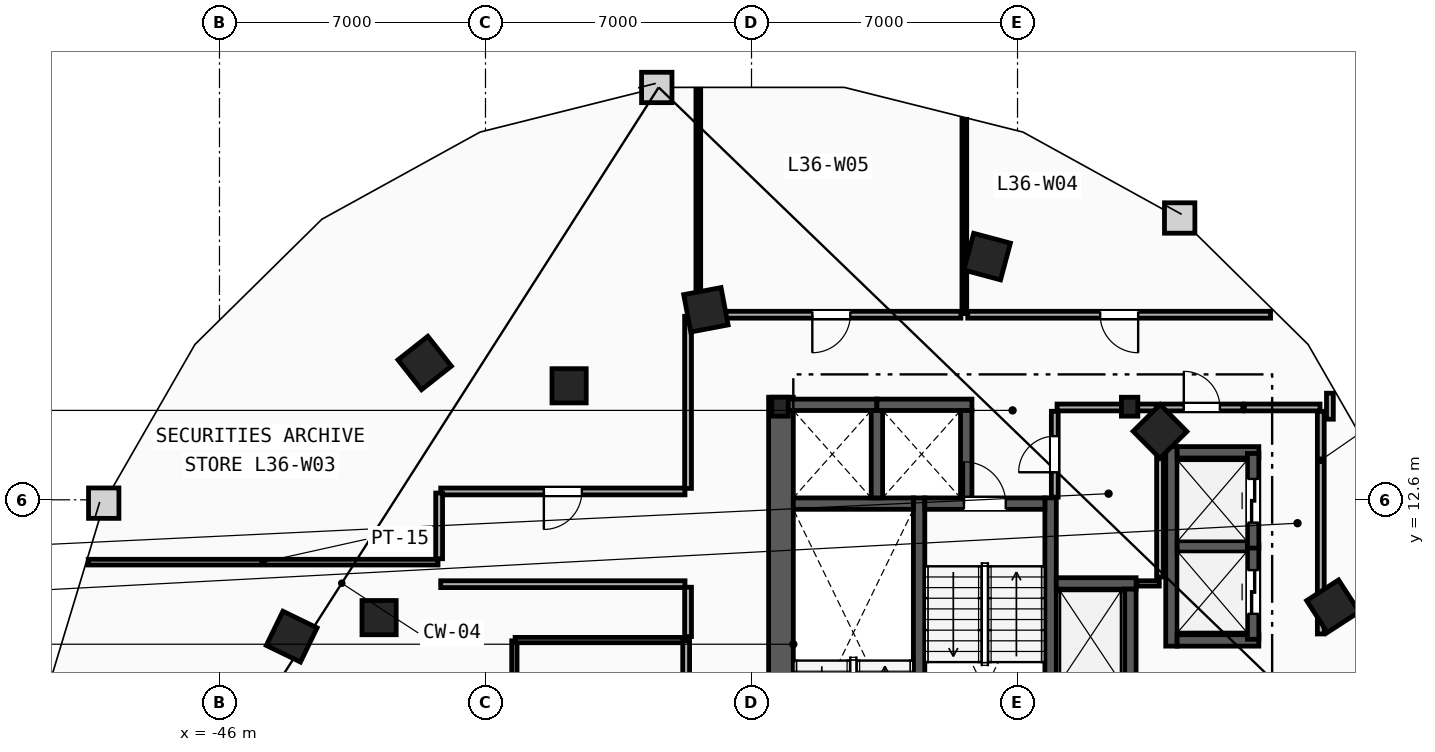
"""IFC4 building model, lengths in metres.
Left out: names, types, materials, properties, quantities, classifications, styles, units other than length and angle.
Written with IfcOpenShell. Run it as: python <this file> out.ifc"""

import sys

from ifc_helpers import new_model, si_unit, direction, frame, frame_2d, origin, origin_2d, place, context, subcontext, project, spatial, rectangle, i_section, extrude, element, fill, save


model = new_model("IFC4")
c1 = context("Model", 3, precision=1e-05, world=origin(), true_north=direction((0.0, 1.0)))
c2 = subcontext(c1, "Body", "Model", "MODEL_VIEW")
j1 = project(units=[si_unit("LENGTHUNIT", "METRE"), si_unit("PLANEANGLEUNIT", "RADIAN")], contexts=[c1])
p1 = place(None, origin())
s1 = spatial("IfcSite", under=j1, at=p1, CompositionType="ELEMENT")
p2 = place(p1, origin())
s2 = spatial("IfcBuilding", under=s1, at=p2, CompositionType="ELEMENT")
p3 = place(p2, frame((0.0, 0.0, 140.4)))
s3 = spatial("IfcBuildingStorey", under=s2, at=p3, CompositionType="ELEMENT", Elevation=140.4)
for number, where, z_axis, x_axis in (
    (1, (-22.05, 15.05, 0.0), (0.0, 0.0, 1.0), (1.0, 0.0, 0.0)),
    (2, (-31.25, 15.05, 0.0), (0.0, 0.0, 1.0), (1.0, 0.0, 0.0)),
):
    element("IfcColumn", number, at=place(p3, frame(where, z_axis=z_axis, x_axis=x_axis)), inside=s3, PredefinedType="COLUMN", context=c2, shape_type="SweptSolid", body=[
        extrude(i_section(OverallWidth=0.432, OverallDepth=0.498, WebThickness=0.056, FlangeThickness=0.089, FilletRadius=0.018, at=origin_2d()), origin(), (0.0, 0.0, 1.0), 3.6),
    ])
for number, where, z_axis, x_axis in (
    (3, (-41.8, 9.5, 0.0), (0.0, 0.0, 1.0), (1.0, 0.0, 0.0)),
    (4, (-36.8, 15.6, 0.0), (0.0, 0.0, 1.0), (1.0, 0.0, 0.0)),
):
    element("IfcColumn", number, at=place(p3, frame(where, z_axis=z_axis, x_axis=x_axis)), inside=s3, PredefinedType="COLUMN", context=c2, shape_type="SweptSolid", body=[
        extrude(rectangle(XDim=0.9, YDim=0.9, at=origin_2d()), origin(), (0.0, 0.0, 1.0), 3.6),
    ])
for number, where, z_axis, x_axis in (
    (5, (-16.7, 9.8, 0.0), (0.0, 0.0, 1.0), (-0.544, 0.839, 0.0)),
    (6, (-21.25, 14.4, 0.0), (0.0, 0.0, 1.0), (-0.703, 0.711, 0.0)),
    (7, (-25.8, 19.0, 0.0), (0.0, 0.0, 1.0), (-0.966, 0.259, 0.0)),
    (8, (-33.2, 17.6, 0.0), (0.0, 0.0, 1.0), (-0.983, -0.186, 0.0)),
    (9, (-40.6, 16.2, 0.0), (0.0, 0.0, 1.0), (-0.785, -0.619, 0.0)),
    (10, (-44.1, 9.0, 0.0), (0.0, 0.0, 1.0), (-0.437, -0.899, 0.0)),
):
    element("IfcColumn", number, at=place(p3, frame(where, z_axis=z_axis, x_axis=x_axis)), inside=s3, PredefinedType="COLUMN", context=c2, shape_type="SweptSolid", body=[
        extrude(rectangle(XDim=1.0, YDim=1.0, at=origin_2d()), origin(), (0.0, 0.0, 1.0), 3.6),
    ])
p4 = place(p3, frame((-31.225, 1.97, 0.0), z_axis=(0.0, 0.0, 1.0), x_axis=(0.0, 1.0, 0.0)))
e11 = element("IfcWall", 11, at=p4, inside=s3, PredefinedType="SHEAR", context=c2, shape_type="SweptSolid", body=[
    extrude(rectangle(XDim=13.33, YDim=0.65, at=frame_2d((6.665, 0.0))), origin(), (0.0, 0.0, 1.0), 3.36),
])
for number, where, z_axis, x_axis in (
    (12, (-27.59, 1.97, 0.0), (0.0, 0.0, 1.0), (0.0, 1.0, 0.0)),
    (13, (-24.13, 1.97, 0.0), (0.0, 0.0, 1.0), (0.0, 1.0, 0.0)),
):
    element("IfcWall", number, at=place(p3, frame(where, z_axis=z_axis, x_axis=x_axis)), inside=s3, PredefinedType="SHEAR", context=c2, shape_type="SweptSolid", body=[
        extrude(rectangle(XDim=10.68, YDim=0.3, at=frame_2d((5.34, 0.0))), origin(), (0.0, 0.0, 1.0), 3.36),
    ])
p5 = place(p3, frame((-30.9, 12.5, 0.0), z_axis=(0.0, 0.0, 1.0), x_axis=(1.0, 0.0, 0.0)))
e14 = element("IfcWall", 14, at=p5, inside=s3, PredefinedType="SHEAR", context=c2, shape_type="SweptSolid", body=[
    extrude(rectangle(XDim=3.16, YDim=0.3, at=frame_2d((1.58, 0.0))), origin(), (0.0, 0.0, 1.0), 3.36),
])
p6 = place(p3, frame((-27.44, 12.5, 0.0), z_axis=(0.0, 0.0, 1.0), x_axis=(1.0, 0.0, 0.0)))
e15 = element("IfcWall", 15, at=p6, inside=s3, PredefinedType="SHEAR", context=c2, shape_type="SweptSolid", body=[
    extrude(rectangle(XDim=3.16, YDim=0.3, at=frame_2d((1.58, 0.0))), origin(), (0.0, 0.0, 1.0), 3.36),
])
p7 = place(p6, frame((1.03, 0.0, 0.0)))
e16 = element("IfcOpeningElement", 16, at=p7, cuts=e15, PredefinedType="OPENING", context=c2, shape_type="SweptSolid", body=[
    extrude(rectangle(XDim=1.1, YDim=2.15, at=frame_2d((0.55, 1.075))), frame((0.0, 0.16, 0.0), z_axis=(0.0, -1.0, 0.0), x_axis=(1.0, 0.0, 0.0)), (0.0, 0.0, 1.0), 0.32),
])
p8 = place(p3, frame((-23.98, 10.4, 0.0), z_axis=(0.0, 0.0, 1.0), x_axis=(1.0, 0.0, 0.0)))
e17 = element("IfcWall", 17, at=p8, inside=s3, PredefinedType="SHEAR", context=c2, shape_type="SweptSolid", body=[
    extrude(rectangle(XDim=2.1, YDim=0.3, at=frame_2d((1.05, 0.0))), origin(), (0.0, 0.0, 1.0), 3.36),
])
for number, where, z_axis, x_axis in (
    (18, (-22.03, 7.75, 0.0), (0.0, 0.0, 1.0), (0.0, 1.0, 0.0)),
    (19, (-31.2, 15.1, 0.0), (0.0, 0.0, 1.0), (1.0, 0.0, 0.0)),
):
    element("IfcWall", number, at=place(p3, frame(where, z_axis=z_axis, x_axis=x_axis)), inside=s3, PredefinedType="SHEAR", context=c2, shape_type="SweptSolid", body=[
        extrude(rectangle(XDim=2.5, YDim=0.3, at=frame_2d((1.25, 0.0))), origin(), (0.0, 0.0, 1.0), 3.36),
    ])
p9 = place(p3, frame((-28.7, 12.65, 0.0), z_axis=(0.0, 0.0, 1.0), x_axis=(0.0, 1.0, 0.0)))
e20 = element("IfcWall", 20, at=p9, inside=s3, PredefinedType="SHEAR", context=c2, shape_type="SweptSolid", body=[
    extrude(rectangle(XDim=2.3, YDim=0.3, at=frame_2d((1.15, 0.0))), origin(), (0.0, 0.0, 1.0), 3.36),
])
p10 = place(p3, frame((-28.7, 15.1, 0.0), z_axis=(0.0, 0.0, 1.0), x_axis=(1.0, 0.0, 0.0)))
e21 = element("IfcWall", 21, at=p10, inside=s3, PredefinedType="SHEAR", context=c2, shape_type="SweptSolid", body=[
    extrude(rectangle(XDim=2.5, YDim=0.3, at=frame_2d((1.25, 0.0))), origin(), (0.0, 0.0, 1.0), 3.36),
])
p11 = place(p3, frame((-26.35, 12.65, 0.0), z_axis=(0.0, 0.0, 1.0), x_axis=(0.0, 1.0, 0.0)))
e22 = element("IfcWall", 22, at=p11, inside=s3, PredefinedType="SHEAR", context=c2, shape_type="SweptSolid", body=[
    extrude(rectangle(XDim=2.3, YDim=0.3, at=frame_2d((1.15, 0.0))), origin(), (0.0, 0.0, 1.0), 3.36),
])
p12 = place(p3, frame((-20.95, 8.75, 0.0), z_axis=(0.0, 0.0, 1.0), x_axis=(0.0, 1.0, 0.0)))
e23 = element("IfcWall", 23, at=p12, inside=s3, PredefinedType="SHEAR", context=c2, shape_type="SweptSolid", body=[
    extrude(rectangle(XDim=5.25, YDim=0.3, at=frame_2d((2.625, 0.0))), origin(), (0.0, 0.0, 1.0), 3.36),
])
for number, where, z_axis, x_axis in (
    (24, (-20.8, 8.9, 0.0), (0.0, 0.0, 1.0), (1.0, 0.0, 0.0)),
    (25, (-20.8, 13.85, 0.0), (0.0, 0.0, 1.0), (1.0, 0.0, 0.0)),
):
    element("IfcWall", number, at=place(p3, frame(where, z_axis=z_axis, x_axis=x_axis)), inside=s3, PredefinedType="SHEAR", context=c2, shape_type="SweptSolid", body=[
        extrude(rectangle(XDim=2.15, YDim=0.3, at=frame_2d((1.075, 0.0))), origin(), (0.0, 0.0, 1.0), 3.36),
    ])
p13 = place(p3, frame((-20.8, 11.375, 0.0), z_axis=(0.0, 0.0, 1.0), x_axis=(1.0, 0.0, 0.0)))
e26 = element("IfcWall", 26, at=p13, inside=s3, PredefinedType="SHEAR", context=c2, shape_type="SweptSolid", body=[
    extrude(rectangle(XDim=1.85, YDim=0.3, at=frame_2d((0.925, 0.0))), origin(), (0.0, 0.0, 1.0), 3.36),
])
p14 = place(p3, frame((-18.8, 8.93, 0.0), z_axis=(0.0, 0.0, 1.0), x_axis=(0.0, 1.0, 0.0)))
e27 = element("IfcWall", 27, at=p14, inside=s3, PredefinedType="SHEAR", context=c2, shape_type="SweptSolid", body=[
    extrude(rectangle(XDim=2.49, YDim=0.3, at=frame_2d((1.245, 0.0))), origin(), (0.0, 0.0, 1.0), 3.36),
])
p15 = place(p14, frame((0.67, 0.0, 0.0)))
e28 = element("IfcOpeningElement", 28, at=p15, cuts=e27, PredefinedType="OPENING", context=c2, shape_type="SweptSolid", body=[
    extrude(rectangle(XDim=1.15, YDim=2.2, at=frame_2d((0.575, 1.1))), frame((0.0, 0.16, 0.0), z_axis=(0.0, -1.0, 0.0), x_axis=(1.0, 0.0, 0.0)), (0.0, 0.0, 1.0), 0.32),
])
p16 = place(p3, frame((-18.8, 11.33, 0.0), z_axis=(0.0, 0.0, 1.0), x_axis=(0.0, 1.0, 0.0)))
e29 = element("IfcWall", 29, at=p16, inside=s3, PredefinedType="SHEAR", context=c2, shape_type="SweptSolid", body=[
    extrude(rectangle(XDim=2.49, YDim=0.3, at=frame_2d((1.245, 0.0))), origin(), (0.0, 0.0, 1.0), 3.36),
])
p17 = place(p16, frame((0.67, 0.0, 0.0)))
e30 = element("IfcOpeningElement", 30, at=p17, cuts=e29, PredefinedType="OPENING", context=c2, shape_type="SweptSolid", body=[
    extrude(rectangle(XDim=1.15, YDim=2.2, at=frame_2d((0.575, 1.1))), frame((0.0, 0.16, 0.0), z_axis=(0.0, -1.0, 0.0), x_axis=(1.0, 0.0, 0.0)), (0.0, 0.0, 1.0), 0.32),
])
p18 = place(p3, frame((-17.02, 9.07, 0.0), z_axis=(0.0, 0.0, 1.0), x_axis=(0.0, 1.0, 0.0)))
e31 = element("IfcWall", 31, at=p18, inside=s3, PredefinedType="PARTITIONING", context=c2, shape_type="SweptSolid", body=[
    extrude(rectangle(XDim=5.86, YDim=0.18, at=frame_2d((2.93, 0.0))), origin(), (0.0, 0.0, 1.0), 3.36),
])
p19 = place(p3, frame((-21.23, 15.03, 0.0), z_axis=(0.0, 0.0, 1.0), x_axis=(1.0, 0.0, 0.0)))
e32 = element("IfcWall", 32, at=p19, inside=s3, PredefinedType="PARTITIONING", context=c2, shape_type="SweptSolid", body=[
    extrude(rectangle(XDim=2.16, YDim=0.18, at=frame_2d((1.08, 0.0))), origin(), (0.0, 0.0, 1.0), 3.36),
])
p20 = place(p19, frame((0.605, 0.0, 0.0)))
e33 = element("IfcOpeningElement", 33, at=p20, cuts=e32, PredefinedType="OPENING", context=c2, shape_type="SweptSolid", body=[
    extrude(rectangle(XDim=0.95, YDim=2.1, at=frame_2d((0.475, 1.05))), frame((0.0, 0.1, 0.0), z_axis=(0.0, -1.0, 0.0), x_axis=(1.0, 0.0, 0.0)), (0.0, 0.0, 1.0), 0.2),
])
p21 = place(p3, frame((-19.03, 15.03, 0.0), z_axis=(0.0, 0.0, 1.0), x_axis=(1.0, 0.0, 0.0)))
e34 = element("IfcWall", 34, at=p21, inside=s3, PredefinedType="PARTITIONING", context=c2, shape_type="SweptSolid", body=[
    extrude(rectangle(XDim=1.99, YDim=0.18, at=frame_2d((0.995, 0.0))), origin(), (0.0, 0.0, 1.0), 3.36),
])
p22 = place(p3, frame((-21.86, 10.4, 0.0), z_axis=(0.0, 0.0, 1.0), x_axis=(1.0, 0.0, 0.0)))
e35 = element("IfcWall", 35, at=p22, inside=s3, PredefinedType="PARTITIONING", context=c2, shape_type="SweptSolid", body=[
    extrude(rectangle(XDim=0.59, YDim=0.14, at=frame_2d((0.295, 0.0))), origin(), (0.0, 0.0, 1.0), 3.36),
])
p23 = place(p3, frame((-21.25, 10.57, 0.0), z_axis=(0.0, 0.0, 1.0), x_axis=(0.0, 1.0, 0.0)))
e36 = element("IfcWall", 36, at=p23, inside=s3, PredefinedType="PARTITIONING", context=c2, shape_type="SweptSolid", body=[
    extrude(rectangle(XDim=4.36, YDim=0.18, at=frame_2d((2.18, 0.0))), origin(), (0.0, 0.0, 1.0), 3.36),
])
p24 = place(p3, frame((-23.96, 15.03, 0.0), z_axis=(0.0, 0.0, 1.0), x_axis=(1.0, 0.0, 0.0)))
e37 = element("IfcWall", 37, at=p24, inside=s3, PredefinedType="PARTITIONING", context=c2, shape_type="SweptSolid", body=[
    extrude(rectangle(XDim=2.61, YDim=0.18, at=frame_2d((1.305, 0.0))), origin(), (0.0, 0.0, 1.0), 2.433),
])
p25 = place(p3, frame((-24.02, 12.67, 0.0), z_axis=(0.0, 0.0, 1.0), x_axis=(0.0, 1.0, 0.0)))
e38 = element("IfcWall", 38, at=p25, inside=s3, PredefinedType="PARTITIONING", context=c2, shape_type="SweptSolid", body=[
    extrude(rectangle(XDim=2.26, YDim=0.18, at=frame_2d((1.13, 0.0))), origin(), (0.0, 0.0, 1.0), 3.36),
])
p26 = place(p25, frame((0.655, 0.0, 0.0)))
e39 = element("IfcOpeningElement", 39, at=p26, cuts=e38, PredefinedType="OPENING", context=c2, shape_type="SweptSolid", body=[
    extrude(rectangle(XDim=0.95, YDim=2.1, at=frame_2d((0.475, 1.05))), frame((0.0, 0.1, 0.0), z_axis=(0.0, -1.0, 0.0), x_axis=(1.0, 0.0, 0.0)), (0.0, 0.0, 1.0), 0.2),
])
p27 = place(p3, frame((-38.24, 4.715, 0.0), z_axis=(0.0, 0.0, 1.0), x_axis=(0.0, 1.0, 0.0)))
e40 = element("IfcWall", 40, at=p27, inside=s3, PredefinedType="PARTITIONING", context=c2, shape_type="SweptSolid", body=[
    extrude(rectangle(XDim=4.175, YDim=0.14, at=frame_2d((2.087, 0.0))), origin(), (0.0, 0.0, 1.0), 3.36),
])
p28 = place(p3, frame((-38.22, 8.91, 0.0), z_axis=(0.0, 0.0, 1.0), x_axis=(1.0, 0.0, 0.0)))
e41 = element("IfcWall", 41, at=p28, inside=s3, PredefinedType="PARTITIONING", context=c2, shape_type="SweptSolid", body=[
    extrude(rectangle(XDim=4.48, YDim=0.14, at=frame_2d((2.24, 0.0))), origin(), (0.0, 0.0, 1.0), 3.36),
])
p29 = place(p3, frame((-33.72, 4.73, 0.0), z_axis=(0.0, 0.0, 1.0), x_axis=(0.0, 1.0, 0.0)))
e42 = element("IfcWall", 42, at=p29, inside=s3, PredefinedType="PARTITIONING", context=c2, shape_type="SweptSolid", body=[
    extrude(rectangle(XDim=4.16, YDim=0.18, at=frame_2d((2.08, 0.0))), origin(), (0.0, 0.0, 1.0), 3.36),
])
p30 = place(p29, frame((1.58, 0.0, 0.0)))
e43 = element("IfcOpeningElement", 43, at=p30, cuts=e42, PredefinedType="OPENING", context=c2, shape_type="SweptSolid", body=[
    extrude(rectangle(XDim=1.0, YDim=2.15, at=frame_2d((0.5, 1.075))), frame((0.0, 0.1, 0.0), z_axis=(0.0, -1.0, 0.0), x_axis=(1.0, 0.0, 0.0)), (0.0, 0.0, 1.0), 0.2),
])
p31 = place(p3, frame((-49.454, 10.96, 0.0), z_axis=(0.0, 0.0, 1.0), x_axis=(1.0, 0.0, 0.0)))
e44 = element("IfcWall", 44, at=p31, inside=s3, PredefinedType="PARTITIONING", context=c2, shape_type="SweptSolid", body=[
    extrude(rectangle(XDim=9.204, YDim=0.15, at=frame_2d((4.602, 0.0))), origin(), (0.0, 0.0, 1.0), 3.36),
])
p32 = place(p3, frame((-33.4, 17.5, 0.0), z_axis=(0.0, 0.0, 1.0), x_axis=(0.0, 1.0, 0.0)))
e45 = element("IfcWall", 45, at=p32, inside=s3, PredefinedType="PARTITIONING", context=c2, shape_type="SweptSolid", body=[
    extrude(rectangle(XDim=5.902, YDim=0.125, at=frame_2d((2.951, 0.0))), origin(), (0.0, 0.0, 1.0), 3.36),
])
p33 = place(p3, frame((-26.4, 17.5, 0.0), z_axis=(0.0, 0.0, 1.0), x_axis=(0.0, 1.0, 0.0)))
e46 = element("IfcWall", 46, at=p33, inside=s3, PredefinedType="PARTITIONING", context=c2, shape_type="SweptSolid", body=[
    extrude(rectangle(XDim=5.111, YDim=0.125, at=frame_2d((2.556, 0.0))), origin(), (0.0, 0.0, 1.0), 3.36),
])
p34 = place(p3, frame((-40.178, 10.38, 0.0), z_axis=(0.0, 0.0, 1.0), x_axis=(1.0, 0.0, 0.0)))
e47 = element("IfcWall", 47, at=p34, inside=s3, PredefinedType="PARTITIONING", context=c2, shape_type="SweptSolid", body=[
    extrude(rectangle(XDim=6.428, YDim=0.18, at=frame_2d((3.214, 0.0))), origin(), (0.0, 0.0, 1.0), 3.36),
])
p35 = place(p3, frame((-33.67, 10.3, 0.0), z_axis=(0.0, 0.0, 1.0), x_axis=(0.0, -1.0, 0.0)))
e48 = element("IfcWall", 48, at=p35, inside=s3, PredefinedType="PARTITIONING", context=c2, shape_type="SweptSolid", body=[
    extrude(rectangle(XDim=1.299, YDim=0.18, at=frame_2d((0.649, 0.0))), origin(), (0.0, 0.0, 1.0), 3.36),
])
p36 = place(p3, frame((-16.78, 14.721, 0.0), z_axis=(0.0, 0.0, 1.0), x_axis=(0.0, 1.0, 0.0)))
e49 = element("IfcWall", 49, at=p36, inside=s3, PredefinedType="PARTITIONING", context=c2, shape_type="SweptSolid", body=[
    extrude(rectangle(XDim=0.684, YDim=0.18, at=frame_2d((0.342, 0.0))), origin(), (0.0, 0.0, 1.0), 3.36),
])
p37 = place(p3, frame((-33.75, 12.82, 0.0), z_axis=(0.0, 0.0, 1.0), x_axis=(-1.0, 0.0, 0.0)))
e50 = element("IfcWall", 50, at=p37, inside=s3, PredefinedType="PARTITIONING", context=c2, shape_type="SweptSolid", body=[
    extrude(rectangle(XDim=6.428, YDim=0.18, at=frame_2d((3.214, 0.0))), origin(), (0.0, 0.0, 1.0), 3.36),
])
p38 = place(p37, frame((2.714, 0.0, 0.0)))
e51 = element("IfcOpeningElement", 51, at=p38, cuts=e50, PredefinedType="OPENING", context=c2, shape_type="SweptSolid", body=[
    extrude(rectangle(XDim=1.0, YDim=2.15, at=frame_2d((0.5, 1.075))), frame((0.0, 0.1, 0.0), z_axis=(0.0, -1.0, 0.0), x_axis=(1.0, 0.0, 0.0)), (0.0, 0.0, 1.0), 0.2),
])
p39 = place(p3, frame((-33.67, 17.428, 0.0), z_axis=(0.0, 0.0, 1.0), x_axis=(0.0, -1.0, 0.0)))
e52 = element("IfcWall", 52, at=p39, inside=s3, PredefinedType="PARTITIONING", context=c2, shape_type="SweptSolid", body=[
    extrude(rectangle(XDim=4.529, YDim=0.18, at=frame_2d((2.264, 0.0))), origin(), (0.0, 0.0, 1.0), 3.36),
])
p40 = place(p3, frame((-40.22, 12.779, 0.0), z_axis=(0.0, 0.0, 1.0), x_axis=(0.0, -1.0, 0.0)))
e53 = element("IfcWall", 53, at=p40, inside=s3, PredefinedType="PARTITIONING", context=c2, shape_type="SweptSolid", body=[
    extrude(rectangle(XDim=1.729, YDim=0.18, at=frame_2d((0.864, 0.0))), origin(), (0.0, 0.0, 1.0), 3.36),
])
p41 = place(p3, frame((-18.342, 17.47, 0.0), z_axis=(0.0, 0.0, 1.0), x_axis=(-1.0, 0.0, 0.0)))
e54 = element("IfcWall", 54, at=p41, inside=s3, PredefinedType="PARTITIONING", context=c2, shape_type="SweptSolid", body=[
    extrude(rectangle(XDim=7.968, YDim=0.18, at=frame_2d((3.984, 0.0))), origin(), (0.0, 0.0, 1.0), 3.36),
])
p42 = place(p41, frame((3.484, 0.0, 0.0)))
e55 = element("IfcOpeningElement", 55, at=p42, cuts=e54, PredefinedType="OPENING", context=c2, shape_type="SweptSolid", body=[
    extrude(rectangle(XDim=1.0, YDim=2.15, at=frame_2d((0.5, 1.075))), frame((0.0, 0.1, 0.0), z_axis=(0.0, -1.0, 0.0), x_axis=(1.0, 0.0, 0.0)), (0.0, 0.0, 1.0), 0.2),
])
p43 = place(p3, frame((-26.49, 17.47, 0.0), z_axis=(0.0, 0.0, 1.0), x_axis=(-1.0, 0.0, 0.0)))
e56 = element("IfcWall", 56, at=p43, inside=s3, PredefinedType="PARTITIONING", context=c2, shape_type="SweptSolid", body=[
    extrude(rectangle(XDim=6.82, YDim=0.18, at=frame_2d((3.41, 0.0))), origin(), (0.0, 0.0, 1.0), 3.36),
])
p44 = place(p43, frame((2.91, 0.0, 0.0)))
e57 = element("IfcOpeningElement", 57, at=p44, cuts=e56, PredefinedType="OPENING", context=c2, shape_type="SweptSolid", body=[
    extrude(rectangle(XDim=1.0, YDim=2.15, at=frame_2d((0.5, 1.075))), frame((0.0, 0.1, 0.0), z_axis=(0.0, -1.0, 0.0), x_axis=(1.0, 0.0, 0.0)), (0.0, 0.0, 1.0), 0.2),
])
p45 = place(p7, origin())
e58 = element("IfcDoor", 58, at=p45, inside=s3, OperationType="SINGLE_SWING_LEFT", PredefinedType="DOOR", context=c2, shape_type="SweptSolid", body=[
    extrude(rectangle(XDim=1.1, YDim=2.15, at=frame_2d((0.55, 1.075))), frame((0.0, 0.025, 0.0), z_axis=(0.0, -1.0, 0.0), x_axis=(1.0, 0.0, 0.0)), (0.0, 0.0, 1.0), 0.05),
])
fill(e16, e58)
p46 = place(p15, origin())
e59 = element("IfcDoor", 59, at=p46, inside=s3, OperationType="SLIDING_TO_LEFT", PredefinedType="TRAPDOOR", context=c2, shape_type="SweptSolid", body=[
    extrude(rectangle(XDim=1.15, YDim=2.2, at=frame_2d((0.575, 1.1))), frame((0.0, 0.025, 0.0), z_axis=(0.0, -1.0, 0.0), x_axis=(1.0, 0.0, 0.0)), (0.0, 0.0, 1.0), 0.05),
])
fill(e28, e59)
p47 = place(p17, origin())
e60 = element("IfcDoor", 60, at=p47, inside=s3, OperationType="SLIDING_TO_LEFT", PredefinedType="TRAPDOOR", context=c2, shape_type="SweptSolid", body=[
    extrude(rectangle(XDim=1.15, YDim=2.2, at=frame_2d((0.575, 1.1))), frame((0.0, 0.025, 0.0), z_axis=(0.0, -1.0, 0.0), x_axis=(1.0, 0.0, 0.0)), (0.0, 0.0, 1.0), 0.05),
])
fill(e30, e60)
p48 = place(p42, origin())
e61 = element("IfcDoor", 61, at=p48, inside=s3, OperationType="SINGLE_SWING_LEFT", PredefinedType="DOOR", context=c2, shape_type="SweptSolid", body=[
    extrude(rectangle(XDim=1.0, YDim=2.15, at=frame_2d((0.5, 1.075))), frame((0.0, 0.025, 0.0), z_axis=(0.0, -1.0, 0.0), x_axis=(1.0, 0.0, 0.0)), (0.0, 0.0, 1.0), 0.05),
])
fill(e55, e61)
p49 = place(p44, origin())
e62 = element("IfcDoor", 62, at=p49, inside=s3, OperationType="SINGLE_SWING_RIGHT", PredefinedType="DOOR", context=c2, shape_type="SweptSolid", body=[
    extrude(rectangle(XDim=1.0, YDim=2.15, at=frame_2d((0.5, 1.075))), frame((0.0, 0.025, 0.0), z_axis=(0.0, -1.0, 0.0), x_axis=(1.0, 0.0, 0.0)), (0.0, 0.0, 1.0), 0.05),
])
fill(e57, e62)
p50 = place(p38, origin())
e63 = element("IfcDoor", 63, at=p50, inside=s3, OperationType="SINGLE_SWING_RIGHT", PredefinedType="DOOR", context=c2, shape_type="SweptSolid", body=[
    extrude(rectangle(XDim=1.0, YDim=2.15, at=frame_2d((0.5, 1.075))), frame((0.0, 0.025, 0.0), z_axis=(0.0, -1.0, 0.0), x_axis=(1.0, 0.0, 0.0)), (0.0, 0.0, 1.0), 0.05),
])
fill(e51, e63)
p51 = place(p26, origin())
e64 = element("IfcDoor", 64, at=p51, inside=s3, OperationType="SINGLE_SWING_LEFT", PredefinedType="DOOR", context=c2, shape_type="SweptSolid", body=[
    extrude(rectangle(XDim=0.95, YDim=2.1, at=frame_2d((0.475, 1.05))), frame((0.0, 0.025, 0.0), z_axis=(0.0, -1.0, 0.0), x_axis=(1.0, 0.0, 0.0)), (0.0, 0.0, 1.0), 0.05),
])
fill(e39, e64)
p52 = place(p20, origin())
e65 = element("IfcDoor", 65, at=p52, inside=s3, OperationType="SINGLE_SWING_LEFT", PredefinedType="DOOR", context=c2, shape_type="SweptSolid", body=[
    extrude(rectangle(XDim=0.95, YDim=2.1, at=frame_2d((0.475, 1.05))), frame((0.0, 0.025, 0.0), z_axis=(0.0, -1.0, 0.0), x_axis=(1.0, 0.0, 0.0)), (0.0, 0.0, 1.0), 0.05),
])
fill(e33, e65)
save(model, sys.argv[1])
